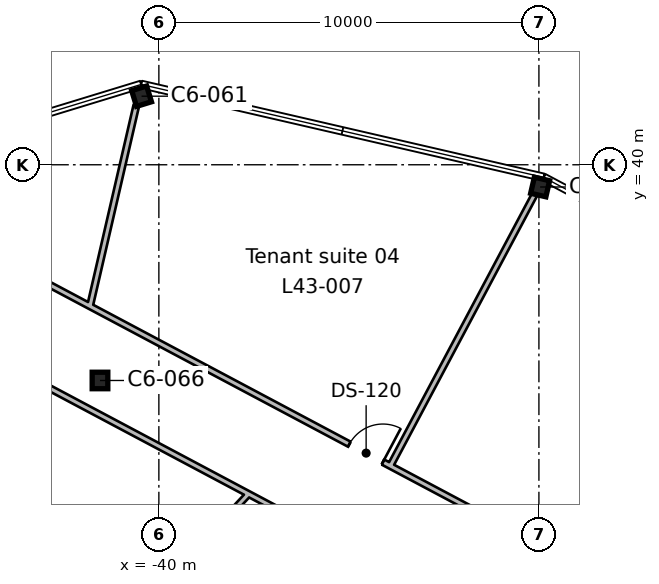
"""IFC4 building model, lengths in metres.
Left out: names, types, materials, properties, quantities, classifications, styles, units other than length and angle.
Written with IfcOpenShell. Run it as: python <this file> out.ifc"""

import sys

from ifc_helpers import new_model, si_unit, direction, frame, frame_2d, origin, origin_2d, place, context, subcontext, project, spatial, rectangle, i_section, extrude, element, fill, save


model = new_model("IFC4")
c1 = context("Model", 3, precision=1e-05, world=origin(), true_north=direction((0.0, 1.0)))
c2 = subcontext(c1, "Body", "Model", "MODEL_VIEW")
j1 = project(units=[si_unit("LENGTHUNIT", "METRE"), si_unit("PLANEANGLEUNIT", "RADIAN")], contexts=[c1])
p1 = place(None, origin())
s1 = spatial("IfcSite", under=j1, at=p1, CompositionType="ELEMENT")
p2 = place(p1, origin())
s2 = spatial("IfcBuilding", under=s1, at=p2, CompositionType="ELEMENT")
p3 = place(p2, frame((0.0, 0.0, 201.3)))
s3 = spatial("IfcBuildingStorey", under=s2, at=p3, CompositionType="ELEMENT", Elevation=201.3)
for number, where, z_axis, x_axis in (
    (1, (-41.549, 34.324, 0.0), (0.0, 0.0, 1.0), (1.0, 0.0, 0.0)),
    (2, (-29.968, 39.415, 0.0), (0.0, 0.0, 1.0), (-0.974, 0.225, 0.0)),
    (3, (-40.455, 41.804, 0.0), (0.0, 0.0, 1.0), (-0.956, -0.292, 0.0)),
):
    element("IfcColumn", number, at=place(p3, frame(where, z_axis=z_axis, x_axis=x_axis)), inside=s3, PredefinedType="COLUMN", context=c2, shape_type="SweptSolid", body=[
        extrude(i_section(OverallWidth=0.412, OverallDepth=0.434, WebThickness=0.036, FlangeThickness=0.057, FilletRadius=0.015, at=origin_2d()), origin(), (0.0, 0.0, 1.0), 3.9),
    ])
p4 = place(p3, frame((-54.714, 35.096, 0.0), z_axis=(0.0, 0.0, 1.0), x_axis=(0.73136184742, -0.681989624656, 0.0)))
e4 = element("IfcWall", 4, at=p4, inside=s3, PredefinedType="PARTITIONING", context=c2, shape_type="SweptSolid", body=[
    extrude(rectangle(XDim=21.312, YDim=0.15, at=frame_2d((10.656, 0.0))), origin(), (0.0, 0.0, 1.0), 3.54),
])
p5 = place(p3, frame((-37.64, 31.339, 0.0), z_axis=(0.0, 0.0, 1.0), x_axis=(-0.681983873773, -0.731367210035, 0.0)))
e5 = element("IfcWall", 5, at=p5, inside=s3, PredefinedType="PARTITIONING", context=c2, shape_type="SweptSolid", body=[
    extrude(rectangle(XDim=3.461, YDim=0.15, at=frame_2d((1.73, 0.0))), origin(), (0.0, 0.0, 1.0), 3.54),
])
p6 = place(p3, frame((-34.332, 29.58, 0.0), z_axis=(0.0, 0.0, 1.0), x_axis=(-0.882939350293, 0.46948706447, 0.0)))
e6 = element("IfcWall", 6, at=p6, inside=s3, PredefinedType="PARTITIONING", context=c2, shape_type="SweptSolid", body=[
    extrude(rectangle(XDim=19.327, YDim=0.15, at=frame_2d((9.664, 0.0))), origin(), (0.0, 0.0, 1.0), 3.54),
])
p7 = place(p3, frame((-48.541, 39.854, 0.0), z_axis=(0.0, 0.0, 1.0), x_axis=(0.882945008423, -0.469476423372, 0.0)))
e7 = element("IfcWall", 7, at=p7, inside=s3, PredefinedType="PARTITIONING", context=c2, shape_type="SweptSolid", body=[
    extrude(rectangle(XDim=54.976, YDim=0.15, at=frame_2d((27.488, 0.0))), origin(), (0.0, 0.0, 1.0), 3.54),
])
p8 = place(p7, frame((39.35, 0.0, 0.0)))
e8 = element("IfcOpeningElement", 8, at=p8, cuts=e7, PredefinedType="OPENING", context=c2, shape_type="SweptSolid", body=[
    extrude(rectangle(XDim=1.0, YDim=2.1, at=frame_2d((0.5, 1.05))), frame((0.0, 0.085, 0.0), z_axis=(0.0, -1.0, 0.0), x_axis=(1.0, 0.0, 0.0)), (0.0, 0.0, 1.0), 0.17),
])
p9 = place(p7, frame((28.05, 0.0, 0.0)))
e9 = element("IfcOpeningElement", 9, at=p9, cuts=e7, PredefinedType="OPENING", context=c2, shape_type="SweptSolid", body=[
    extrude(rectangle(XDim=1.0, YDim=2.1, at=frame_2d((0.5, 1.05))), frame((0.0, 0.085, 0.0), z_axis=(0.0, -1.0, 0.0), x_axis=(1.0, 0.0, 0.0)), (0.0, 0.0, 1.0), 0.17),
])
p10 = place(p7, frame((26.449, 0.0, 0.0)))
e10 = element("IfcOpeningElement", 10, at=p10, cuts=e7, PredefinedType="OPENING", context=c2, shape_type="SweptSolid", body=[
    extrude(rectangle(XDim=1.0, YDim=2.1, at=frame_2d((0.5, 1.05))), frame((0.0, 0.085, 0.0), z_axis=(0.0, -1.0, 0.0), x_axis=(1.0, 0.0, 0.0)), (0.0, 0.0, 1.0), 0.17),
])
p11 = place(p7, frame((15.35, 0.0, 0.0)))
e11 = element("IfcOpeningElement", 11, at=p11, cuts=e7, PredefinedType="OPENING", context=c2, shape_type="SweptSolid", body=[
    extrude(rectangle(XDim=1.0, YDim=2.1, at=frame_2d((0.5, 1.05))), frame((0.0, 0.085, 0.0), z_axis=(0.0, -1.0, 0.0), x_axis=(1.0, 0.0, 0.0)), (0.0, 0.0, 1.0), 0.17),
])
p12 = place(p3, frame((-30.109, 39.225, 0.0), z_axis=(0.0, 0.0, 1.0), x_axis=(-0.469490973279, -0.882937271843, 0.0)))
e12 = element("IfcWall", 12, at=p12, inside=s3, PredefinedType="PARTITIONING", context=c2, shape_type="SweptSolid", body=[
    extrude(rectangle(XDim=8.098, YDim=0.15, at=frame_2d((4.049, 0.0))), origin(), (0.0, 0.0, 1.0), 3.54),
])
p13 = place(p3, frame((-41.813, 36.276, 0.0), z_axis=(0.0, 0.0, 1.0), x_axis=(0.22495163737, 0.974369930183, 0.0)))
e13 = element("IfcWall", 13, at=p13, inside=s3, PredefinedType="PARTITIONING", context=c2, shape_type="SweptSolid", body=[
    extrude(rectangle(XDim=5.419, YDim=0.15, at=frame_2d((2.709, 0.0))), origin(), (0.0, 0.0, 1.0), 3.54),
])
p14 = place(p11, origin())
e14 = element("IfcDoor", 14, at=p14, inside=s3, OperationType="SINGLE_SWING_RIGHT", PredefinedType="DOOR", context=c2, shape_type="SweptSolid", body=[
    extrude(rectangle(XDim=1.0, YDim=2.1, at=frame_2d((0.5, 1.05))), frame((0.0, 0.025, 0.0), z_axis=(0.0, -1.0, 0.0), x_axis=(1.0, 0.0, 0.0)), (0.0, 0.0, 1.0), 0.05),
])
fill(e11, e14)
save(model, sys.argv[1])
